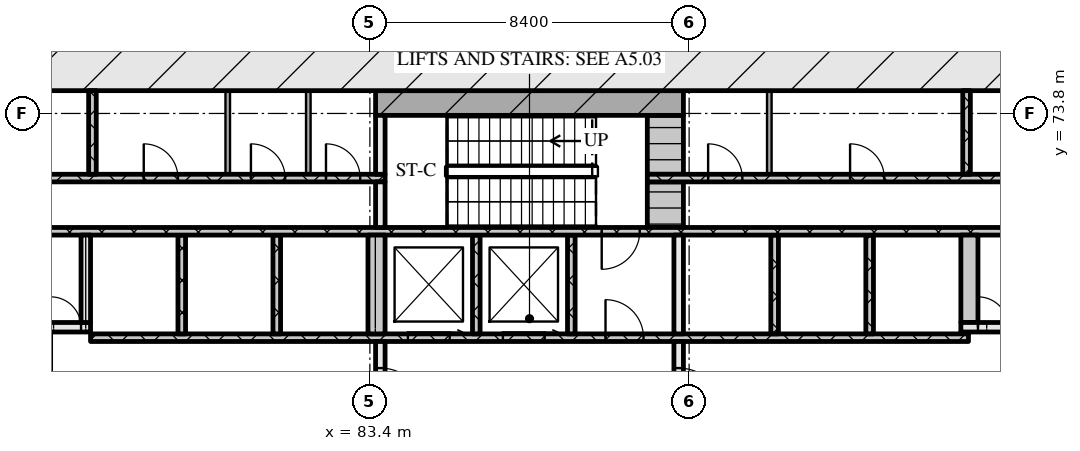
"""IFC4 building model, lengths in metres.
Left out: names, types, materials, properties, quantities, classifications, styles, units other than length and angle.
Written with IfcOpenShell. Run it as: python <this file> out.ifc"""

import sys

from ifc_helpers import new_model, si_unit, direction, frame, frame_2d, origin, place, context, subcontext, project, spatial, rectangle, extrude, element, fill, save


model = new_model("IFC4")
c1 = context("Model", 3, precision=1e-05, world=origin(), true_north=direction((0.0, 1.0)))
c2 = subcontext(c1, "Body", "Model", "MODEL_VIEW")
j1 = project(units=[si_unit("LENGTHUNIT", "METRE"), si_unit("PLANEANGLEUNIT", "RADIAN")], contexts=[c1])
p1 = place(None, origin())
s1 = spatial("IfcSite", under=j1, at=p1, CompositionType="ELEMENT")
p2 = place(p1, origin())
s2 = spatial("IfcBuilding", under=s1, at=p2, CompositionType="ELEMENT")
p3 = place(p2, frame((0.0, 0.0, 9.0)))
s3 = spatial("IfcBuildingStorey", under=s2, at=p3, CompositionType="ELEMENT", Elevation=9.0)
p4 = place(p3, frame((66.6, 75.0, 0.0), z_axis=(0.0, 0.0, 1.0), x_axis=(1.0, 0.0, 0.0)))
e1 = element("IfcWall", 1, at=p4, inside=s3, PredefinedType="SOLIDWALL", context=c2, shape_type="SweptSolid", body=[
    extrude(rectangle(XDim=42.0, YDim=1.2, at=frame_2d((21.0, 0.0))), origin(), (0.0, 0.0, 1.0), 5.1),
])
p5 = place(p3, frame((83.675, 65.2, 0.0), z_axis=(0.0, 0.0, 1.0), x_axis=(0.0, 1.0, 0.0)))
e2 = element("IfcWall", 2, at=p5, inside=s3, PredefinedType="SOLIDWALL", context=c2, shape_type="SweptSolid", body=[
    extrude(rectangle(XDim=2.6, YDim=0.25, at=frame_2d((1.3, 0.0))), origin(), (0.0, 0.0, 1.0), 5.1),
])
p6 = place(p5, frame((0.7, 0.0, 0.0)))
e3 = element("IfcOpeningElement", 3, at=p6, cuts=e2, PredefinedType="OPENING", context=c2, shape_type="SweptSolid", body=[
    extrude(rectangle(XDim=1.2, YDim=2.1, at=frame_2d((0.6, 1.05))), frame((0.0, 0.135, 0.0), z_axis=(0.0, -1.0, 0.0), x_axis=(1.0, 0.0, 0.0)), (0.0, 0.0, 1.0), 0.27),
])
p7 = place(p3, frame((91.525, 65.2, 0.0), z_axis=(0.0, 0.0, 1.0), x_axis=(0.0, 1.0, 0.0)))
e4 = element("IfcWall", 4, at=p7, inside=s3, PredefinedType="SOLIDWALL", context=c2, shape_type="SweptSolid", body=[
    extrude(rectangle(XDim=2.6, YDim=0.25, at=frame_2d((1.3, 0.0))), origin(), (0.0, 0.0, 1.0), 5.1),
])
p8 = place(p7, frame((0.7, 0.0, 0.0)))
e5 = element("IfcOpeningElement", 5, at=p8, cuts=e4, PredefinedType="OPENING", context=c2, shape_type="SweptSolid", body=[
    extrude(rectangle(XDim=1.2, YDim=2.1, at=frame_2d((0.6, 1.05))), frame((0.0, 0.135, 0.0), z_axis=(0.0, -1.0, 0.0), x_axis=(1.0, 0.0, 0.0)), (0.0, 0.0, 1.0), 0.27),
])
p9 = place(p3, frame((76.05, 67.9, 0.0), z_axis=(0.0, 0.0, 1.0), x_axis=(1.0, 0.0, 0.0)))
e6 = element("IfcWall", 6, at=p9, inside=s3, PredefinedType="SOLIDWALL", context=c2, shape_type="SweptSolid", body=[
    extrude(rectangle(XDim=23.1, YDim=0.2, at=frame_2d((11.55, 0.0))), origin(), (0.0, 0.0, 1.0), 5.1),
])
p10 = place(p9, frame((8.35, 0.0, 0.0)))
e7 = element("IfcOpeningElement", 7, at=p10, cuts=e6, PredefinedType="OPENING", context=c2, shape_type="SweptSolid", body=[
    extrude(rectangle(XDim=1.1, YDim=2.1, at=frame_2d((0.55, 1.05))), frame((0.0, 0.11, 0.0), z_axis=(0.0, -1.0, 0.0), x_axis=(1.0, 0.0, 0.0)), (0.0, 0.0, 1.0), 0.22),
])
p11 = place(p9, frame((10.85, 0.0, 0.0)))
e8 = element("IfcOpeningElement", 8, at=p11, cuts=e6, PredefinedType="OPENING", context=c2, shape_type="SweptSolid", body=[
    extrude(rectangle(XDim=1.1, YDim=2.1, at=frame_2d((0.55, 1.05))), frame((0.0, 0.11, 0.0), z_axis=(0.0, -1.0, 0.0), x_axis=(1.0, 0.0, 0.0)), (0.0, 0.0, 1.0), 0.22),
])
p12 = place(p9, frame((13.55, 0.0, 0.0)))
e9 = element("IfcOpeningElement", 9, at=p12, cuts=e6, PredefinedType="OPENING", context=c2, shape_type="SweptSolid", body=[
    extrude(rectangle(XDim=1.0, YDim=2.1, at=frame_2d((0.5, 1.05))), frame((0.0, 0.11, 0.0), z_axis=(0.0, -1.0, 0.0), x_axis=(1.0, 0.0, 0.0)), (0.0, 0.0, 1.0), 0.22),
])
for number, where, z_axis, x_axis in (
    (10, (78.45, 68.0, 0.0), (0.0, 0.0, 1.0), (0.0, 1.0, 0.0)),
    (11, (80.95, 68.0, 0.0), (0.0, 0.0, 1.0), (0.0, 1.0, 0.0)),
):
    element("IfcWall", number, at=place(p3, frame(where, z_axis=z_axis, x_axis=x_axis)), inside=s3, PredefinedType="SOLIDWALL", context=c2, shape_type="SweptSolid", body=[
        extrude(rectangle(XDim=2.6, YDim=0.2, at=frame_2d((1.3, 0.0))), origin(), (0.0, 0.0, 1.0), 5.1),
    ])
p13 = place(p3, frame((83.575, 68.0, 0.0), z_axis=(0.0, 0.0, 1.0), x_axis=(0.0, 1.0, 0.0)))
e12 = element("IfcWall", 12, at=p13, inside=s3, PredefinedType="SOLIDWALL", context=c2, shape_type="SweptSolid", body=[
    extrude(rectangle(XDim=2.6, YDim=0.45, at=frame_2d((1.3, 0.0))), origin(), (0.0, 0.0, 1.0), 5.1),
])
for number, where, z_axis, x_axis in (
    (13, (86.2, 68.0, 0.0), (0.0, 0.0, 1.0), (0.0, 1.0, 0.0)),
    (14, (88.7, 68.0, 0.0), (0.0, 0.0, 1.0), (0.0, 1.0, 0.0)),
):
    element("IfcWall", number, at=place(p3, frame(where, z_axis=z_axis, x_axis=x_axis)), inside=s3, PredefinedType="SOLIDWALL", context=c2, shape_type="SweptSolid", body=[
        extrude(rectangle(XDim=2.6, YDim=0.2, at=frame_2d((1.3, 0.0))), origin(), (0.0, 0.0, 1.0), 5.1),
    ])
p14 = place(p3, frame((91.525, 68.0, 0.0), z_axis=(0.0, 0.0, 1.0), x_axis=(0.0, 1.0, 0.0)))
e15 = element("IfcWall", 15, at=p14, inside=s3, PredefinedType="SOLIDWALL", context=c2, shape_type="SweptSolid", body=[
    extrude(rectangle(XDim=2.6, YDim=0.25, at=frame_2d((1.3, 0.0))), origin(), (0.0, 0.0, 1.0), 5.1),
])
for number, where, z_axis, x_axis in (
    (16, (94.05, 68.0, 0.0), (0.0, 0.0, 1.0), (0.0, 1.0, 0.0)),
    (17, (96.55, 68.0, 0.0), (0.0, 0.0, 1.0), (0.0, 1.0, 0.0)),
):
    element("IfcWall", number, at=place(p3, frame(where, z_axis=z_axis, x_axis=x_axis)), inside=s3, PredefinedType="SOLIDWALL", context=c2, shape_type="SweptSolid", body=[
        extrude(rectangle(XDim=2.6, YDim=0.2, at=frame_2d((1.3, 0.0))), origin(), (0.0, 0.0, 1.0), 5.1),
    ])
p15 = place(p3, frame((98.95, 68.025, 0.0), z_axis=(0.0, 0.0, 1.0), x_axis=(1.0, 0.0, 0.0)))
e18 = element("IfcWall", 18, at=p15, inside=s3, PredefinedType="SOLIDWALL", context=c2, shape_type="SweptSolid", body=[
    extrude(rectangle(XDim=0.2, YDim=0.05, at=frame_2d((0.1, 0.0))), origin(), (0.0, 0.0, 1.0), 5.1),
])
p16 = place(p3, frame((67.8, 68.175, 0.0), z_axis=(0.0, 0.0, 1.0), x_axis=(1.0, 0.0, 0.0)))
e19 = element("IfcWall", 19, at=p16, inside=s3, PredefinedType="SOLIDWALL", context=c2, shape_type="SweptSolid", body=[
    extrude(rectangle(XDim=8.25, YDim=0.25, at=frame_2d((4.125, 0.0))), origin(), (0.0, 0.0, 1.0), 5.1),
])
p17 = place(p16, frame((5.7, 0.0, 0.0)))
e20 = element("IfcOpeningElement", 20, at=p17, cuts=e19, PredefinedType="OPENING", context=c2, shape_type="SweptSolid", body=[
    extrude(rectangle(XDim=1.0, YDim=2.1, at=frame_2d((0.5, 1.05))), frame((0.0, 0.135, 0.0), z_axis=(0.0, -1.0, 0.0), x_axis=(1.0, 0.0, 0.0)), (0.0, 0.0, 1.0), 0.27),
])
p18 = place(p16, frame((7.2, 0.0, 0.0)))
e21 = element("IfcOpeningElement", 21, at=p18, cuts=e19, PredefinedType="OPENING", context=c2, shape_type="SweptSolid", body=[
    extrude(rectangle(XDim=0.8, YDim=2.1, at=frame_2d((0.4, 1.05))), frame((0.0, 0.135, 0.0), z_axis=(0.0, -1.0, 0.0), x_axis=(1.0, 0.0, 0.0)), (0.0, 0.0, 1.0), 0.27),
])
p19 = place(p3, frame((98.95, 68.175, 0.0), z_axis=(0.0, 0.0, 1.0), x_axis=(1.0, 0.0, 0.0)))
e22 = element("IfcWall", 22, at=p19, inside=s3, PredefinedType="SOLIDWALL", context=c2, shape_type="SweptSolid", body=[
    extrude(rectangle(XDim=8.45, YDim=0.25, at=frame_2d((4.225, 0.0))), origin(), (0.0, 0.0, 1.0), 5.1),
])
p20 = place(p19, frame((0.45, 0.0, 0.0)))
e23 = element("IfcOpeningElement", 23, at=p20, cuts=e22, PredefinedType="OPENING", context=c2, shape_type="SweptSolid", body=[
    extrude(rectangle(XDim=0.8, YDim=2.1, at=frame_2d((0.4, 1.05))), frame((0.0, 0.135, 0.0), z_axis=(0.0, -1.0, 0.0), x_axis=(1.0, 0.0, 0.0)), (0.0, 0.0, 1.0), 0.27),
])
p21 = place(p19, frame((1.75, 0.0, 0.0)))
e24 = element("IfcOpeningElement", 24, at=p21, cuts=e22, PredefinedType="OPENING", context=c2, shape_type="SweptSolid", body=[
    extrude(rectangle(XDim=1.0, YDim=2.1, at=frame_2d((0.5, 1.05))), frame((0.0, 0.135, 0.0), z_axis=(0.0, -1.0, 0.0), x_axis=(1.0, 0.0, 0.0)), (0.0, 0.0, 1.0), 0.27),
])
p22 = place(p3, frame((75.925, 68.3, 0.0), z_axis=(0.0, 0.0, 1.0), x_axis=(0.0, 1.0, 0.0)))
e25 = element("IfcWall", 25, at=p22, inside=s3, PredefinedType="SOLIDWALL", context=c2, shape_type="SweptSolid", body=[
    extrude(rectangle(XDim=2.3, YDim=0.25, at=frame_2d((1.15, 0.0))), origin(), (0.0, 0.0, 1.0), 5.1),
])
p23 = place(p3, frame((99.175, 68.3, 0.0), z_axis=(0.0, 0.0, 1.0), x_axis=(0.0, 1.0, 0.0)))
e26 = element("IfcWall", 26, at=p23, inside=s3, PredefinedType="SOLIDWALL", context=c2, shape_type="SweptSolid", body=[
    extrude(rectangle(XDim=2.3, YDim=0.45, at=frame_2d((1.15, 0.0))), origin(), (0.0, 0.0, 1.0), 5.1),
])
p24 = place(p3, frame((67.8, 70.7, 0.0), z_axis=(0.0, 0.0, 1.0), x_axis=(1.0, 0.0, 0.0)))
e27 = element("IfcWall", 27, at=p24, inside=s3, PredefinedType="SOLIDWALL", context=c2, shape_type="SweptSolid", body=[
    extrude(rectangle(XDim=39.6, YDim=0.2, at=frame_2d((19.8, 0.0))), origin(), (0.0, 0.0, 1.0), 5.1),
])
p25 = place(p24, frame((0.65, 0.0, 0.0)))
e28 = element("IfcOpeningElement", 28, at=p25, cuts=e27, PredefinedType="OPENING", context=c2, shape_type="SweptSolid", body=[
    extrude(rectangle(XDim=1.1, YDim=2.1, at=frame_2d((0.55, 1.05))), frame((0.0, 0.11, 0.0), z_axis=(0.0, -1.0, 0.0), x_axis=(1.0, 0.0, 0.0)), (0.0, 0.0, 1.0), 0.22),
])
p26 = place(p24, frame((3.25, 0.0, 0.0)))
e29 = element("IfcOpeningElement", 29, at=p26, cuts=e27, PredefinedType="OPENING", context=c2, shape_type="SweptSolid", body=[
    extrude(rectangle(XDim=1.1, YDim=2.1, at=frame_2d((0.55, 1.05))), frame((0.0, 0.11, 0.0), z_axis=(0.0, -1.0, 0.0), x_axis=(1.0, 0.0, 0.0)), (0.0, 0.0, 1.0), 0.22),
])
p27 = place(p24, frame((5.9, 0.0, 0.0)))
e30 = element("IfcOpeningElement", 30, at=p27, cuts=e27, PredefinedType="OPENING", context=c2, shape_type="SweptSolid", body=[
    extrude(rectangle(XDim=1.0, YDim=2.1, at=frame_2d((0.5, 1.05))), frame((0.0, 0.11, 0.0), z_axis=(0.0, -1.0, 0.0), x_axis=(1.0, 0.0, 0.0)), (0.0, 0.0, 1.0), 0.22),
])
p28 = place(p24, frame((21.7, 0.0, 0.0)))
e31 = element("IfcOpeningElement", 31, at=p28, cuts=e27, PredefinedType="OPENING", context=c2, shape_type="SweptSolid", body=[
    extrude(rectangle(XDim=1.0, YDim=2.1, at=frame_2d((0.5, 1.05))), frame((0.0, 0.11, 0.0), z_axis=(0.0, -1.0, 0.0), x_axis=(1.0, 0.0, 0.0)), (0.0, 0.0, 1.0), 0.22),
])
p29 = place(p24, frame((32.7, 0.0, 0.0)))
e32 = element("IfcOpeningElement", 32, at=p29, cuts=e27, PredefinedType="OPENING", context=c2, shape_type="SweptSolid", body=[
    extrude(rectangle(XDim=1.0, YDim=2.1, at=frame_2d((0.5, 1.05))), frame((0.0, 0.11, 0.0), z_axis=(0.0, -1.0, 0.0), x_axis=(1.0, 0.0, 0.0)), (0.0, 0.0, 1.0), 0.22),
])
p30 = place(p24, frame((35.25, 0.0, 0.0)))
e33 = element("IfcOpeningElement", 33, at=p30, cuts=e27, PredefinedType="OPENING", context=c2, shape_type="SweptSolid", body=[
    extrude(rectangle(XDim=1.1, YDim=2.1, at=frame_2d((0.55, 1.05))), frame((0.0, 0.11, 0.0), z_axis=(0.0, -1.0, 0.0), x_axis=(1.0, 0.0, 0.0)), (0.0, 0.0, 1.0), 0.22),
])
p31 = place(p24, frame((37.85, 0.0, 0.0)))
e34 = element("IfcOpeningElement", 34, at=p31, cuts=e27, PredefinedType="OPENING", context=c2, shape_type="SweptSolid", body=[
    extrude(rectangle(XDim=1.1, YDim=2.1, at=frame_2d((0.55, 1.05))), frame((0.0, 0.11, 0.0), z_axis=(0.0, -1.0, 0.0), x_axis=(1.0, 0.0, 0.0)), (0.0, 0.0, 1.0), 0.22),
])
p32 = place(p3, frame((83.675, 70.8, 0.0), z_axis=(0.0, 0.0, 1.0), x_axis=(0.0, 1.0, 0.0)))
e35 = element("IfcWall", 35, at=p32, inside=s3, PredefinedType="SOLIDWALL", context=c2, shape_type="SweptSolid", body=[
    extrude(rectangle(XDim=1.2, YDim=0.25, at=frame_2d((0.6, 0.0))), origin(), (0.0, 0.0, 1.0), 5.1),
])
p33 = place(p3, frame((91.175, 70.8, 0.0), z_axis=(0.0, 0.0, 1.0), x_axis=(0.0, 1.0, 0.0)))
e36 = element("IfcWall", 36, at=p33, inside=s3, PredefinedType="SOLIDWALL", context=c2, shape_type="SweptSolid", body=[
    extrude(rectangle(XDim=1.2, YDim=0.95, at=frame_2d((0.6, 0.0))), origin(), (0.0, 0.0, 1.0), 5.1),
])
p34 = place(p3, frame((72.8, 72.1, 0.0), z_axis=(0.0, 0.0, 1.0), x_axis=(1.0, 0.0, 0.0)))
e37 = element("IfcWall", 37, at=p34, inside=s3, PredefinedType="SOLIDWALL", context=c2, shape_type="SweptSolid", body=[
    extrude(rectangle(XDim=11.0, YDim=0.2, at=frame_2d((5.5, 0.0))), origin(), (0.0, 0.0, 1.0), 5.1),
])
p35 = place(p34, frame((1.25, 0.0, 0.0)))
e38 = element("IfcOpeningElement", 38, at=p35, cuts=e37, PredefinedType="OPENING", context=c2, shape_type="SweptSolid", body=[
    extrude(rectangle(XDim=0.9, YDim=2.1, at=frame_2d((0.45, 1.05))), frame((0.0, 0.11, 0.0), z_axis=(0.0, -1.0, 0.0), x_axis=(1.0, 0.0, 0.0)), (0.0, 0.0, 1.0), 0.22),
])
p36 = place(p34, frame((4.65, 0.0, 0.0)))
e39 = element("IfcOpeningElement", 39, at=p36, cuts=e37, PredefinedType="OPENING", context=c2, shape_type="SweptSolid", body=[
    extrude(rectangle(XDim=0.9, YDim=2.1, at=frame_2d((0.45, 1.05))), frame((0.0, 0.11, 0.0), z_axis=(0.0, -1.0, 0.0), x_axis=(1.0, 0.0, 0.0)), (0.0, 0.0, 1.0), 0.22),
])
p37 = place(p34, frame((7.47, 0.0, 0.0)))
e40 = element("IfcOpeningElement", 40, at=p37, cuts=e37, PredefinedType="OPENING", context=c2, shape_type="SweptSolid", body=[
    extrude(rectangle(XDim=0.9, YDim=2.1, at=frame_2d((0.45, 1.05))), frame((0.0, 0.11, 0.0), z_axis=(0.0, -1.0, 0.0), x_axis=(1.0, 0.0, 0.0)), (0.0, 0.0, 1.0), 0.22),
])
p38 = place(p34, frame((9.445, 0.0, 0.0)))
e41 = element("IfcOpeningElement", 41, at=p38, cuts=e37, PredefinedType="OPENING", context=c2, shape_type="SweptSolid", body=[
    extrude(rectangle(XDim=0.9, YDim=2.1, at=frame_2d((0.45, 1.05))), frame((0.0, 0.11, 0.0), z_axis=(0.0, -1.0, 0.0), x_axis=(1.0, 0.0, 0.0)), (0.0, 0.0, 1.0), 0.22),
])
p39 = place(p3, frame((90.7, 72.1, 0.0), z_axis=(0.0, 0.0, 1.0), x_axis=(1.0, 0.0, 0.0)))
e42 = element("IfcWall", 42, at=p39, inside=s3, PredefinedType="SOLIDWALL", context=c2, shape_type="SweptSolid", body=[
    extrude(rectangle(XDim=11.7, YDim=0.2, at=frame_2d((5.85, 0.0))), origin(), (0.0, 0.0, 1.0), 5.1),
])
p40 = place(p39, frame((1.6, 0.0, 0.0)))
e43 = element("IfcOpeningElement", 43, at=p40, cuts=e42, PredefinedType="OPENING", context=c2, shape_type="SweptSolid", body=[
    extrude(rectangle(XDim=0.9, YDim=2.1, at=frame_2d((0.45, 1.05))), frame((0.0, 0.11, 0.0), z_axis=(0.0, -1.0, 0.0), x_axis=(1.0, 0.0, 0.0)), (0.0, 0.0, 1.0), 0.22),
])
p41 = place(p39, frame((5.335, 0.0, 0.0)))
e44 = element("IfcOpeningElement", 44, at=p41, cuts=e42, PredefinedType="OPENING", context=c2, shape_type="SweptSolid", body=[
    extrude(rectangle(XDim=0.9, YDim=2.1, at=frame_2d((0.45, 1.05))), frame((0.0, 0.11, 0.0), z_axis=(0.0, -1.0, 0.0), x_axis=(1.0, 0.0, 0.0)), (0.0, 0.0, 1.0), 0.22),
])
p42 = place(p39, frame((9.55, 0.0, 0.0)))
e45 = element("IfcOpeningElement", 45, at=p42, cuts=e42, PredefinedType="OPENING", context=c2, shape_type="SweptSolid", body=[
    extrude(rectangle(XDim=0.9, YDim=2.1, at=frame_2d((0.45, 1.05))), frame((0.0, 0.11, 0.0), z_axis=(0.0, -1.0, 0.0), x_axis=(1.0, 0.0, 0.0)), (0.0, 0.0, 1.0), 0.22),
])
p43 = place(p3, frame((76.1, 72.2, 0.0), z_axis=(0.0, 0.0, 1.0), x_axis=(0.0, 1.0, 0.0)))
e46 = element("IfcWall", 46, at=p43, inside=s3, PredefinedType="SOLIDWALL", context=c2, shape_type="SweptSolid", body=[
    extrude(rectangle(XDim=2.2, YDim=0.2, at=frame_2d((1.1, 0.0))), origin(), (0.0, 0.0, 1.0), 5.1),
])
for number, where, z_axis, x_axis in (
    (47, (79.66, 72.2, 0.0), (0.0, 0.0, 1.0), (0.0, 1.0, 0.0)),
    (48, (81.78, 72.2, 0.0), (0.0, 0.0, 1.0), (0.0, 1.0, 0.0)),
):
    element("IfcWall", number, at=place(p3, frame(where, z_axis=z_axis, x_axis=x_axis)), inside=s3, PredefinedType="PARTITIONING", context=c2, shape_type="SweptSolid", body=[
        extrude(rectangle(XDim=2.2, YDim=0.12, at=frame_2d((1.1, 0.0))), origin(), (0.0, 0.0, 1.0), 5.1),
    ])
p44 = place(p3, frame((83.675, 72.2, 0.0), z_axis=(0.0, 0.0, 1.0), x_axis=(0.0, 1.0, 0.0)))
e49 = element("IfcWall", 49, at=p44, inside=s3, PredefinedType="SOLIDWALL", context=c2, shape_type="SweptSolid", body=[
    extrude(rectangle(XDim=1.55, YDim=0.25, at=frame_2d((0.775, 0.0))), origin(), (0.0, 0.0, 1.0), 5.1),
])
p45 = place(p3, frame((91.175, 72.2, 0.0), z_axis=(0.0, 0.0, 1.0), x_axis=(0.0, 1.0, 0.0)))
e50 = element("IfcWall", 50, at=p45, inside=s3, PredefinedType="SOLIDWALL", context=c2, shape_type="SweptSolid", body=[
    extrude(rectangle(XDim=1.55, YDim=0.95, at=frame_2d((0.775, 0.0))), origin(), (0.0, 0.0, 1.0), 5.1),
])
p46 = place(p3, frame((93.91, 72.2, 0.0), z_axis=(0.0, 0.0, 1.0), x_axis=(0.0, 1.0, 0.0)))
e51 = element("IfcWall", 51, at=p46, inside=s3, PredefinedType="PARTITIONING", context=c2, shape_type="SweptSolid", body=[
    extrude(rectangle(XDim=2.2, YDim=0.12, at=frame_2d((1.1, 0.0))), origin(), (0.0, 0.0, 1.0), 5.1),
])
p47 = place(p3, frame((99.1, 72.2, 0.0), z_axis=(0.0, 0.0, 1.0), x_axis=(0.0, 1.0, 0.0)))
e52 = element("IfcWall", 52, at=p47, inside=s3, PredefinedType="SOLIDWALL", context=c2, shape_type="SweptSolid", body=[
    extrude(rectangle(XDim=2.2, YDim=0.2, at=frame_2d((1.1, 0.0))), origin(), (0.0, 0.0, 1.0), 5.1),
])
p48 = place(p3, frame((83.55, 74.075, 0.0), z_axis=(0.0, 0.0, 1.0), x_axis=(1.0, 0.0, 0.0)))
e53 = element("IfcWall", 53, at=p48, inside=s3, PredefinedType="SOLIDWALL", context=c2, shape_type="SweptSolid", body=[
    extrude(rectangle(XDim=8.1, YDim=0.65, at=frame_2d((4.05, 0.0))), origin(), (0.0, 0.0, 1.0), 5.1),
])
p49 = place(p6, origin())
e54 = element("IfcDoor", 54, at=p49, inside=s3, OperationType="SINGLE_SWING_RIGHT", PredefinedType="DOOR", context=c2, shape_type="SweptSolid", body=[
    extrude(rectangle(XDim=1.2, YDim=2.1, at=frame_2d((0.6, 1.05))), frame((0.0, 0.025, 0.0), z_axis=(0.0, -1.0, 0.0), x_axis=(1.0, 0.0, 0.0)), (0.0, 0.0, 1.0), 0.05),
])
fill(e3, e54)
p50 = place(p8, origin())
e55 = element("IfcDoor", 55, at=p50, inside=s3, OperationType="SINGLE_SWING_RIGHT", PredefinedType="DOOR", context=c2, shape_type="SweptSolid", body=[
    extrude(rectangle(XDim=1.2, YDim=2.1, at=frame_2d((0.6, 1.05))), frame((0.0, 0.025, 0.0), z_axis=(0.0, -1.0, 0.0), x_axis=(1.0, 0.0, 0.0)), (0.0, 0.0, 1.0), 0.05),
])
fill(e5, e55)
p51 = place(p10, origin())
e56 = element("IfcDoor", 56, at=p51, inside=s3, OperationType="SLIDING_TO_RIGHT", PredefinedType="DOOR", context=c2, shape_type="SweptSolid", body=[
    extrude(rectangle(XDim=1.1, YDim=2.1, at=frame_2d((0.55, 1.05))), frame((0.0, 0.025, 0.0), z_axis=(0.0, -1.0, 0.0), x_axis=(1.0, 0.0, 0.0)), (0.0, 0.0, 1.0), 0.05),
])
fill(e7, e56)
p52 = place(p11, origin())
e57 = element("IfcDoor", 57, at=p52, inside=s3, OperationType="SLIDING_TO_RIGHT", PredefinedType="DOOR", context=c2, shape_type="SweptSolid", body=[
    extrude(rectangle(XDim=1.1, YDim=2.1, at=frame_2d((0.55, 1.05))), frame((0.0, 0.025, 0.0), z_axis=(0.0, -1.0, 0.0), x_axis=(1.0, 0.0, 0.0)), (0.0, 0.0, 1.0), 0.05),
])
fill(e8, e57)
p53 = place(p12, origin())
e58 = element("IfcDoor", 58, at=p53, inside=s3, OperationType="SINGLE_SWING_LEFT", PredefinedType="DOOR", context=c2, shape_type="SweptSolid", body=[
    extrude(rectangle(XDim=1.0, YDim=2.1, at=frame_2d((0.5, 1.05))), frame((0.0, 0.025, 0.0), z_axis=(0.0, -1.0, 0.0), x_axis=(1.0, 0.0, 0.0)), (0.0, 0.0, 1.0), 0.05),
])
fill(e9, e58)
p54 = place(p18, origin())
e59 = element("IfcDoor", 59, at=p54, inside=s3, OperationType="SINGLE_SWING_LEFT", PredefinedType="DOOR", context=c2, shape_type="SweptSolid", body=[
    extrude(rectangle(XDim=0.8, YDim=2.1, at=frame_2d((0.4, 1.05))), frame((0.0, 0.025, 0.0), z_axis=(0.0, -1.0, 0.0), x_axis=(1.0, 0.0, 0.0)), (0.0, 0.0, 1.0), 0.05),
])
fill(e21, e59)
p55 = place(p20, origin())
e60 = element("IfcDoor", 60, at=p55, inside=s3, OperationType="SINGLE_SWING_LEFT", PredefinedType="DOOR", context=c2, shape_type="SweptSolid", body=[
    extrude(rectangle(XDim=0.8, YDim=2.1, at=frame_2d((0.4, 1.05))), frame((0.0, 0.025, 0.0), z_axis=(0.0, -1.0, 0.0), x_axis=(1.0, 0.0, 0.0)), (0.0, 0.0, 1.0), 0.05),
])
fill(e23, e60)
p56 = place(p28, origin())
e61 = element("IfcDoor", 61, at=p56, inside=s3, OperationType="SINGLE_SWING_RIGHT", PredefinedType="DOOR", context=c2, shape_type="SweptSolid", body=[
    extrude(rectangle(XDim=1.0, YDim=2.1, at=frame_2d((0.5, 1.05))), frame((0.0, 0.025, 0.0), z_axis=(0.0, -1.0, 0.0), x_axis=(1.0, 0.0, 0.0)), (0.0, 0.0, 1.0), 0.05),
])
fill(e31, e61)
p57 = place(p36, origin())
e62 = element("IfcDoor", 62, at=p57, inside=s3, OperationType="SINGLE_SWING_LEFT", PredefinedType="DOOR", context=c2, shape_type="SweptSolid", body=[
    extrude(rectangle(XDim=0.9, YDim=2.1, at=frame_2d((0.45, 1.05))), frame((0.0, 0.025, 0.0), z_axis=(0.0, -1.0, 0.0), x_axis=(1.0, 0.0, 0.0)), (0.0, 0.0, 1.0), 0.05),
])
fill(e39, e62)
p58 = place(p37, origin())
e63 = element("IfcDoor", 63, at=p58, inside=s3, OperationType="SINGLE_SWING_LEFT", PredefinedType="DOOR", context=c2, shape_type="SweptSolid", body=[
    extrude(rectangle(XDim=0.9, YDim=2.1, at=frame_2d((0.45, 1.05))), frame((0.0, 0.025, 0.0), z_axis=(0.0, -1.0, 0.0), x_axis=(1.0, 0.0, 0.0)), (0.0, 0.0, 1.0), 0.05),
])
fill(e40, e63)
p59 = place(p38, origin())
e64 = element("IfcDoor", 64, at=p59, inside=s3, OperationType="SINGLE_SWING_LEFT", PredefinedType="DOOR", context=c2, shape_type="SweptSolid", body=[
    extrude(rectangle(XDim=0.9, YDim=2.1, at=frame_2d((0.45, 1.05))), frame((0.0, 0.025, 0.0), z_axis=(0.0, -1.0, 0.0), x_axis=(1.0, 0.0, 0.0)), (0.0, 0.0, 1.0), 0.05),
])
fill(e41, e64)
p60 = place(p40, origin())
e65 = element("IfcDoor", 65, at=p60, inside=s3, OperationType="SINGLE_SWING_LEFT", PredefinedType="DOOR", context=c2, shape_type="SweptSolid", body=[
    extrude(rectangle(XDim=0.9, YDim=2.1, at=frame_2d((0.45, 1.05))), frame((0.0, 0.025, 0.0), z_axis=(0.0, -1.0, 0.0), x_axis=(1.0, 0.0, 0.0)), (0.0, 0.0, 1.0), 0.05),
])
fill(e43, e65)
p61 = place(p41, origin())
e66 = element("IfcDoor", 66, at=p61, inside=s3, OperationType="SINGLE_SWING_LEFT", PredefinedType="DOOR", context=c2, shape_type="SweptSolid", body=[
    extrude(rectangle(XDim=0.9, YDim=2.1, at=frame_2d((0.45, 1.05))), frame((0.0, 0.025, 0.0), z_axis=(0.0, -1.0, 0.0), x_axis=(1.0, 0.0, 0.0)), (0.0, 0.0, 1.0), 0.05),
])
fill(e44, e66)
save(model, sys.argv[1])
